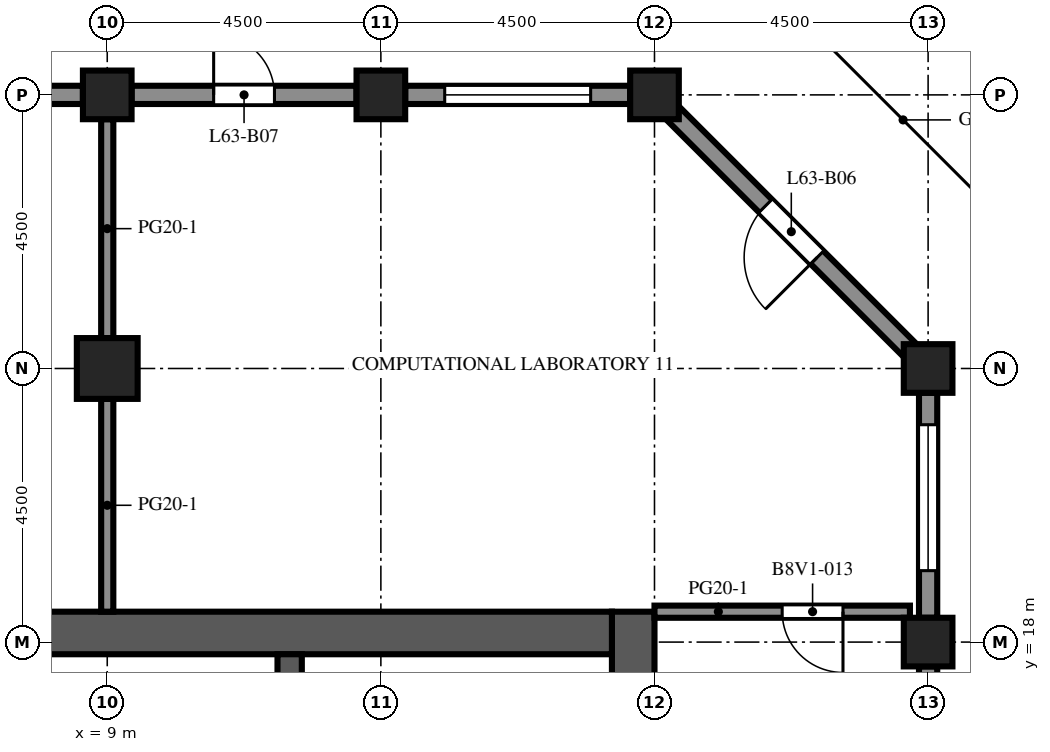
"""IFC4 building model, lengths in metres.
Left out: names, types, materials, properties, quantities, classifications, styles, units other than length and angle.
Written with IfcOpenShell. Run it as: python <this file> out.ifc"""

import sys

from ifc_helpers import new_model, si_unit, direction, frame, frame_2d, origin, origin_2d, place, context, subcontext, project, spatial, rectangle, extrude, element, fill, save


model = new_model("IFC4")
c1 = context("Model", 3, precision=1e-05, world=origin(), true_north=direction((0.0, 1.0)))
c2 = subcontext(c1, "Body", "Model", "MODEL_VIEW")
j1 = project(units=[si_unit("LENGTHUNIT", "METRE"), si_unit("PLANEANGLEUNIT", "RADIAN")], contexts=[c1])
p1 = place(None, origin())
s1 = spatial("IfcSite", under=j1, at=p1, CompositionType="ELEMENT")
p2 = place(p1, origin())
s2 = spatial("IfcBuilding", under=s1, at=p2, CompositionType="ELEMENT")
p3 = place(p2, frame((0.0, 0.0, 278.6)))
s3 = spatial("IfcBuildingStorey", under=s2, at=p3, CompositionType="ELEMENT", Elevation=278.6)
for number, where, z_axis, x_axis in (
    (1, (9.0, 27.0, 0.0), (0.0, 0.0, 1.0), (1.0, 0.0, 0.0)),
    (2, (13.5, 27.0, 0.0), (0.0, 0.0, 1.0), (1.0, 0.0, 0.0)),
    (3, (18.0, 27.0, 0.0), (0.0, 0.0, 1.0), (1.0, 0.0, 0.0)),
    (4, (22.5, 18.0, 0.0), (0.0, 0.0, 1.0), (1.0, 0.0, 0.0)),
    (5, (22.5, 22.5, 0.0), (0.0, 0.0, 1.0), (1.0, 0.0, 0.0)),
):
    element("IfcColumn", number, at=place(p3, frame(where, z_axis=z_axis, x_axis=x_axis)), inside=s3, PredefinedType="COLUMN", context=c2, shape_type="SweptSolid", body=[
        extrude(rectangle(XDim=0.8, YDim=0.8, at=origin_2d()), origin(), (0.0, 0.0, 1.0), 4.1),
    ])
p4 = place(p3, frame((9.0, 22.5, 0.0), z_axis=(0.0, 0.0, 1.0), x_axis=(1.0, 0.0, 0.0)))
e6 = element("IfcColumn", 6, at=p4, inside=s3, PredefinedType="COLUMN", context=c2, shape_type="SweptSolid", body=[
    extrude(rectangle(XDim=1.0, YDim=1.0, at=origin_2d()), origin(), (0.0, 0.0, 1.0), 4.1),
])
p5 = place(p3, frame((17.65, -9.0, 0.0), z_axis=(0.0, 0.0, 1.0), x_axis=(0.0, 1.0, 0.0)))
e7 = element("IfcWall", 7, at=p5, inside=s3, PredefinedType="SHEAR", context=c2, shape_type="SweptSolid", body=[
    extrude(rectangle(XDim=27.5, YDim=0.7, at=frame_2d((13.75, 0.0))), origin(), (0.0, 0.0, 1.0), 4.1),
])
p6 = place(p5, frame((12.55, 0.0, 0.0)))
e8 = element("IfcOpeningElement", 8, at=p6, cuts=e7, PredefinedType="OPENING", context=c2, shape_type="SweptSolid", body=[
    extrude(rectangle(XDim=2.4, YDim=2.4, at=frame_2d((1.2, 1.2))), frame((0.0, 0.36, 0.0), z_axis=(0.0, -1.0, 0.0), x_axis=(1.0, 0.0, 0.0)), (0.0, 0.0, 1.0), 0.72),
])
p7 = place(p5, frame((6.825, 0.0, 0.0)))
e9 = element("IfcOpeningElement", 9, at=p7, cuts=e7, PredefinedType="OPENING", context=c2, shape_type="SweptSolid", body=[
    extrude(rectangle(XDim=1.2, YDim=2.1, at=frame_2d((0.6, 1.05))), frame((0.0, 0.36, 0.0), z_axis=(0.0, -1.0, 0.0), x_axis=(1.0, 0.0, 0.0)), (0.0, 0.0, 1.0), 0.72),
])
p8 = place(p5, frame((19.475, 0.0, 0.0)))
e10 = element("IfcOpeningElement", 10, at=p8, cuts=e7, PredefinedType="OPENING", context=c2, shape_type="SweptSolid", body=[
    extrude(rectangle(XDim=1.2, YDim=2.1, at=frame_2d((0.6, 1.05))), frame((0.0, 0.36, 0.0), z_axis=(0.0, -1.0, 0.0), x_axis=(1.0, 0.0, 0.0)), (0.0, 0.0, 1.0), 0.72),
])
p9 = place(p3, frame((6.7, 18.15, 0.0), z_axis=(0.0, 0.0, 1.0), x_axis=(1.0, 0.0, 0.0)))
e11 = element("IfcWall", 11, at=p9, inside=s3, PredefinedType="SHEAR", context=c2, shape_type="SweptSolid", body=[
    extrude(rectangle(XDim=10.6, YDim=0.7, at=frame_2d((5.3, 0.0))), origin(), (0.0, 0.0, 1.0), 4.1),
])
p10 = place(p3, frame((12.0, 10.2, 0.0), z_axis=(0.0, 0.0, 1.0), x_axis=(0.0, 1.0, 0.0)))
e12 = element("IfcWall", 12, at=p10, inside=s3, PredefinedType="SHEAR", context=c2, shape_type="SweptSolid", body=[
    extrude(rectangle(XDim=7.6, YDim=0.4, at=frame_2d((3.8, 0.0))), origin(), (0.0, 0.0, 1.0), 4.1),
])
p11 = place(p3, frame((22.5, 17.6, 0.0), z_axis=(0.0, 0.0, 1.0), x_axis=(0.0, -1.0, 0.0)))
e13 = element("IfcWall", 13, at=p11, inside=s3, PredefinedType="SOLIDWALL", context=c2, shape_type="SweptSolid", body=[
    extrude(rectangle(XDim=3.7, YDim=0.3, at=frame_2d((1.85, 0.0))), origin(), (0.0, 0.0, 1.0), 2.85),
])
p12 = place(p11, frame((1.35, 0.0, 0.0)))
e14 = element("IfcOpeningElement", 14, at=p12, cuts=e13, PredefinedType="OPENING", context=c2, shape_type="SweptSolid", body=[
    extrude(rectangle(XDim=1.0, YDim=2.2, at=frame_2d((0.5, 1.1))), frame((0.0, 0.16, 0.0), z_axis=(0.0, -1.0, 0.0), x_axis=(1.0, 0.0, 0.0)), (0.0, 0.0, 1.0), 0.32),
])
p13 = place(p3, frame((22.5, 22.1, 0.0), z_axis=(0.0, 0.0, 1.0), x_axis=(0.0, -1.0, 0.0)))
e15 = element("IfcWall", 15, at=p13, inside=s3, PredefinedType="SOLIDWALL", context=c2, shape_type="SweptSolid", body=[
    extrude(rectangle(XDim=3.7, YDim=0.3, at=frame_2d((1.85, 0.0))), origin(), (0.0, 0.0, 1.0), 2.85),
])
p14 = place(p13, frame((0.525, 0.0, 0.8)))
e16 = element("IfcOpeningElement", 16, at=p14, cuts=e15, PredefinedType="OPENING", context=c2, shape_type="SweptSolid", body=[
    extrude(rectangle(XDim=2.4, YDim=1.7, at=frame_2d((1.2, 0.85))), frame((0.0, 0.16, 0.0), z_axis=(0.0, -1.0, 0.0), x_axis=(1.0, 0.0, 0.0)), (0.0, 0.0, 1.0), 0.32),
])
p15 = place(p3, frame((18.294, 26.706, 0.0), z_axis=(0.0, 0.0, 1.0), x_axis=(0.707106781187, -0.707106781187, 0.0)))
e17 = element("IfcWall", 17, at=p15, inside=s3, PredefinedType="SOLIDWALL", context=c2, shape_type="SweptSolid", body=[
    extrude(rectangle(XDim=5.532, YDim=0.3, at=frame_2d((2.766, 0.0))), origin(), (0.0, 0.0, 1.0), 2.85),
])
p16 = place(p15, frame((2.166, 0.0, 0.0)))
e18 = element("IfcOpeningElement", 18, at=p16, cuts=e17, PredefinedType="OPENING", context=c2, shape_type="SweptSolid", body=[
    extrude(rectangle(XDim=1.2, YDim=2.2, at=frame_2d((0.6, 1.1))), frame((0.0, 0.16, 0.0), z_axis=(0.0, -1.0, 0.0), x_axis=(1.0, 0.0, 0.0)), (0.0, 0.0, 1.0), 0.32),
])
p17 = place(p3, frame((13.9, 27.0, 0.0), z_axis=(0.0, 0.0, 1.0), x_axis=(1.0, 0.0, 0.0)))
e19 = element("IfcWall", 19, at=p17, inside=s3, PredefinedType="SOLIDWALL", context=c2, shape_type="SweptSolid", body=[
    extrude(rectangle(XDim=3.7, YDim=0.3, at=frame_2d((1.85, 0.0))), origin(), (0.0, 0.0, 1.0), 2.85),
])
p18 = place(p17, frame((0.65, 0.0, 0.8)))
e20 = element("IfcOpeningElement", 20, at=p18, cuts=e19, PredefinedType="OPENING", context=c2, shape_type="SweptSolid", body=[
    extrude(rectangle(XDim=2.4, YDim=1.7, at=frame_2d((1.2, 0.85))), frame((0.0, 0.16, 0.0), z_axis=(0.0, -1.0, 0.0), x_axis=(1.0, 0.0, 0.0)), (0.0, 0.0, 1.0), 0.32),
])
p19 = place(p3, frame((9.4, 27.0, 0.0), z_axis=(0.0, 0.0, 1.0), x_axis=(1.0, 0.0, 0.0)))
e21 = element("IfcWall", 21, at=p19, inside=s3, PredefinedType="SOLIDWALL", context=c2, shape_type="SweptSolid", body=[
    extrude(rectangle(XDim=3.7, YDim=0.3, at=frame_2d((1.85, 0.0))), origin(), (0.0, 0.0, 1.0), 2.85),
])
p20 = place(p19, frame((1.35, 0.0, 0.0)))
e22 = element("IfcOpeningElement", 22, at=p20, cuts=e21, PredefinedType="OPENING", context=c2, shape_type="SweptSolid", body=[
    extrude(rectangle(XDim=1.0, YDim=2.2, at=frame_2d((0.5, 1.1))), frame((0.0, 0.16, 0.0), z_axis=(0.0, -1.0, 0.0), x_axis=(1.0, 0.0, 0.0)), (0.0, 0.0, 1.0), 0.32),
])
p21 = place(p3, frame((4.9, 27.0, 0.0), z_axis=(0.0, 0.0, 1.0), x_axis=(1.0, 0.0, 0.0)))
e23 = element("IfcWall", 23, at=p21, inside=s3, PredefinedType="SOLIDWALL", context=c2, shape_type="SweptSolid", body=[
    extrude(rectangle(XDim=3.7, YDim=0.3, at=frame_2d((1.85, 0.0))), origin(), (0.0, 0.0, 1.0), 2.85),
])
p22 = place(p21, frame((0.65, 0.0, 0.8)))
e24 = element("IfcOpeningElement", 24, at=p22, cuts=e23, PredefinedType="OPENING", context=c2, shape_type="SweptSolid", body=[
    extrude(rectangle(XDim=2.4, YDim=1.7, at=frame_2d((1.2, 0.85))), frame((0.0, 0.16, 0.0), z_axis=(0.0, -1.0, 0.0), x_axis=(1.0, 0.0, 0.0)), (0.0, 0.0, 1.0), 0.32),
])
p23 = place(p3, frame((9.0, 18.5, 0.0), z_axis=(0.0, 0.0, 1.0), x_axis=(0.0, 1.0, 0.0)))
e25 = element("IfcWall", 25, at=p23, inside=s3, PredefinedType="PARTITIONING", context=c2, shape_type="SweptSolid", body=[
    extrude(rectangle(XDim=3.5, YDim=0.2, at=frame_2d((1.75, 0.0))), origin(), (0.0, 0.0, 1.0), 3.65),
])
p24 = place(p3, frame((9.0, 23.0, 0.0), z_axis=(0.0, 0.0, 1.0), x_axis=(0.0, 1.0, 0.0)))
e26 = element("IfcWall", 26, at=p24, inside=s3, PredefinedType="PARTITIONING", context=c2, shape_type="SweptSolid", body=[
    extrude(rectangle(XDim=3.6, YDim=0.2, at=frame_2d((1.8, 0.0))), origin(), (0.0, 0.0, 1.0), 3.65),
])
p25 = place(p3, frame((18.0, 18.5, 0.0), z_axis=(0.0, 0.0, 1.0), x_axis=(1.0, 0.0, 0.0)))
e27 = element("IfcWall", 27, at=p25, inside=s3, PredefinedType="PARTITIONING", context=c2, shape_type="SweptSolid", body=[
    extrude(rectangle(XDim=4.201, YDim=0.2, at=frame_2d((2.101, 0.0))), origin(), (0.0, 0.0, 1.0), 3.65),
])
p26 = place(p25, frame((2.1, 0.0, 0.0)))
e28 = element("IfcOpeningElement", 28, at=p26, cuts=e27, PredefinedType="OPENING", context=c2, shape_type="SweptSolid", body=[
    extrude(rectangle(XDim=1.0, YDim=2.1, at=frame_2d((0.5, 1.05))), frame((0.0, 0.11, 0.0), z_axis=(0.0, -1.0, 0.0), x_axis=(1.0, 0.0, 0.0)), (0.0, 0.0, 1.0), 0.22),
])
p27 = place(p14, origin())
e29 = element("IfcWindow", 29, at=p27, inside=s3, PartitioningType="SINGLE_PANEL", PredefinedType="WINDOW", context=c2, shape_type="SweptSolid", body=[
    extrude(rectangle(XDim=2.4, YDim=1.7, at=frame_2d((1.2, 0.85))), frame((0.0, 0.03, 0.0), z_axis=(0.0, -1.0, 0.0), x_axis=(1.0, 0.0, 0.0)), (0.0, 0.0, 1.0), 0.06),
])
fill(e16, e29)
p28 = place(p16, origin())
e30 = element("IfcDoor", 30, at=p28, inside=s3, OperationType="SINGLE_SWING_RIGHT", PredefinedType="DOOR", context=c2, shape_type="SweptSolid", body=[
    extrude(rectangle(XDim=1.2, YDim=2.2, at=frame_2d((0.6, 1.1))), frame((0.0, 0.025, 0.0), z_axis=(0.0, -1.0, 0.0), x_axis=(1.0, 0.0, 0.0)), (0.0, 0.0, 1.0), 0.05),
])
fill(e18, e30)
p29 = place(p18, origin())
e31 = element("IfcWindow", 31, at=p29, inside=s3, PartitioningType="SINGLE_PANEL", PredefinedType="WINDOW", context=c2, shape_type="SweptSolid", body=[
    extrude(rectangle(XDim=2.4, YDim=1.7, at=frame_2d((1.2, 0.85))), frame((0.0, 0.03, 0.0), z_axis=(0.0, -1.0, 0.0), x_axis=(1.0, 0.0, 0.0)), (0.0, 0.0, 1.0), 0.06),
])
fill(e20, e31)
p30 = place(p20, origin())
e32 = element("IfcDoor", 32, at=p30, inside=s3, OperationType="SINGLE_SWING_LEFT", PredefinedType="DOOR", context=c2, shape_type="SweptSolid", body=[
    extrude(rectangle(XDim=1.0, YDim=2.2, at=frame_2d((0.5, 1.1))), frame((0.0, 0.025, 0.0), z_axis=(0.0, -1.0, 0.0), x_axis=(1.0, 0.0, 0.0)), (0.0, 0.0, 1.0), 0.05),
])
fill(e22, e32)
p31 = place(p26, origin())
e33 = element("IfcDoor", 33, at=p31, inside=s3, OperationType="SINGLE_SWING_RIGHT", PredefinedType="DOOR", context=c2, shape_type="SweptSolid", body=[
    extrude(rectangle(XDim=1.0, YDim=2.1, at=frame_2d((0.5, 1.05))), frame((0.0, 0.025, 0.0), z_axis=(0.0, -1.0, 0.0), x_axis=(1.0, 0.0, 0.0)), (0.0, 0.0, 1.0), 0.05),
])
fill(e28, e33)
save(model, sys.argv[1])
